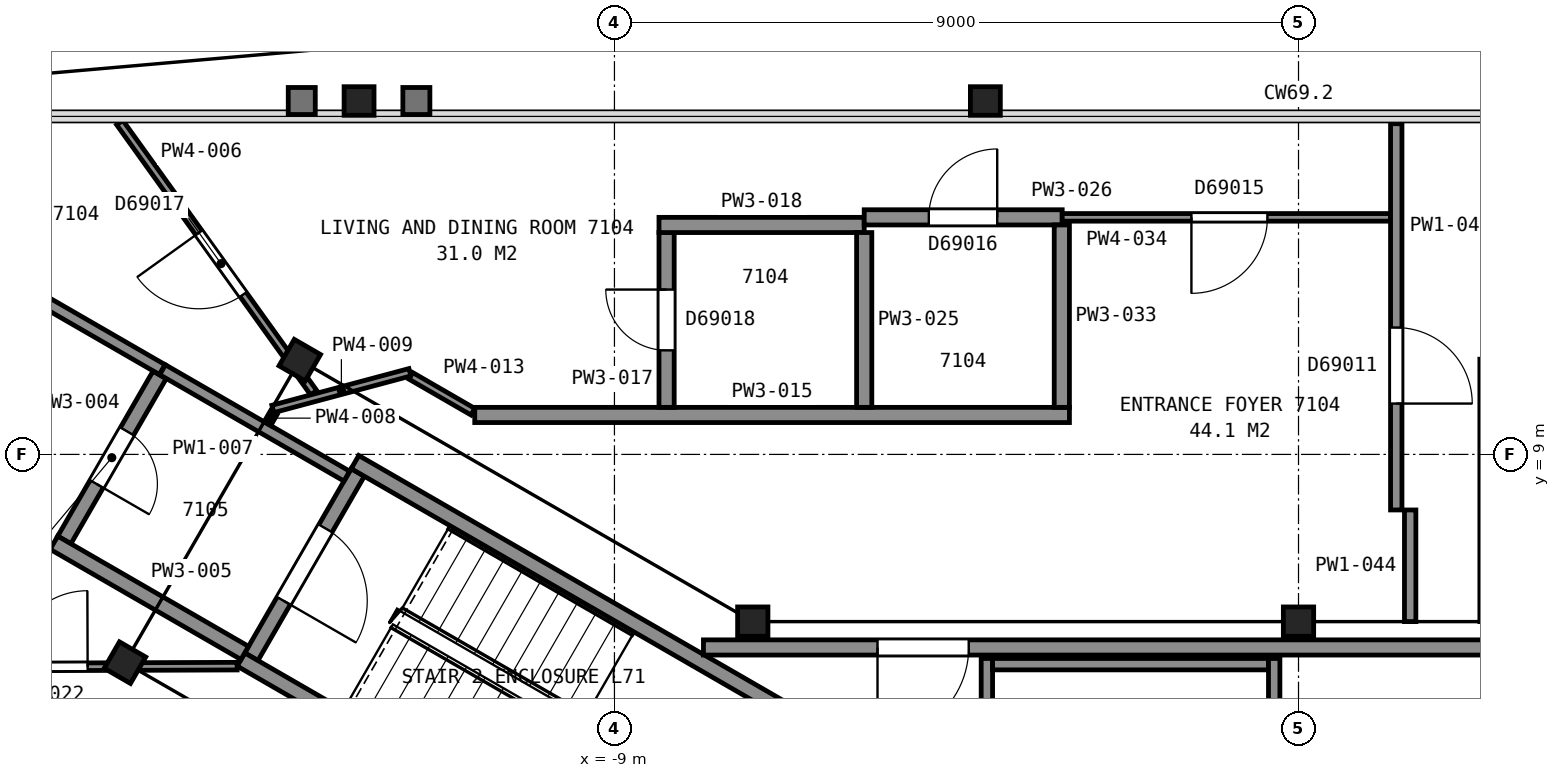
"""IFC4 building model, lengths in metres.
Left out: names, types, materials, properties, quantities, classifications, styles, units other than length and angle.
Written with IfcOpenShell. Run it as: python <this file> out.ifc"""

import sys

from ifc_helpers import new_model, si_unit, direction, frame, frame_2d, origin, origin_2d, place, context, subcontext, project, spatial, rectangle, i_section, extrude, element, fill, save


model = new_model("IFC4")
c1 = context("Model", 3, precision=1e-05, world=origin(), true_north=direction((0.0, 1.0)))
c2 = subcontext(c1, "Body", "Model", "MODEL_VIEW")
j1 = project(units=[si_unit("LENGTHUNIT", "METRE"), si_unit("PLANEANGLEUNIT", "RADIAN")], contexts=[c1])
p1 = place(None, origin())
s1 = spatial("IfcSite", under=j1, at=p1, CompositionType="ELEMENT")
p2 = place(p1, origin())
s2 = spatial("IfcBuilding", under=s1, at=p2, CompositionType="ELEMENT")
p3 = place(p2, frame((0.0, 0.0, 282.5)))
s3 = spatial("IfcBuildingStorey", under=s2, at=p3, CompositionType="ELEMENT", Elevation=282.5)
for number, where, z_axis, x_axis in (
    (1, (-4.12, 13.65, 0.0), (0.0, 0.0, 1.0), (1.0, 0.0, 0.0)),
    (2, (-12.36, 13.65, 0.0), (0.0, 0.0, 1.0), (1.0, 0.0, 0.0)),
):
    element("IfcColumn", number, at=place(p3, frame(where, z_axis=z_axis, x_axis=x_axis)), inside=s3, PredefinedType="COLUMN", context=c2, shape_type="SweptSolid", body=[
        extrude(i_section(OverallWidth=0.394, OverallDepth=0.376, WebThickness=0.017, FlangeThickness=0.028, FilletRadius=0.015, at=origin_2d()), origin(), (0.0, 0.0, 1.0), 3.7),
    ])
for number, where, z_axis, x_axis in (
    (3, (0.0, 6.8, 0.0), (0.0, 0.0, 1.0), (1.0, 0.0, 0.0)),
    (4, (-7.18, 6.8, 0.0), (0.0, 0.0, 1.0), (1.0, 0.0, 0.0)),
):
    element("IfcColumn", number, at=place(p3, frame(where, z_axis=z_axis, x_axis=x_axis)), inside=s3, PredefinedType="COLUMN", context=c2, shape_type="SweptSolid", body=[
        extrude(i_section(OverallWidth=0.399, OverallDepth=0.386, WebThickness=0.021, FlangeThickness=0.033, FilletRadius=0.015, at=origin_2d()), origin(), (0.0, 0.0, 1.0), 3.7),
    ])
for number, where, z_axis, x_axis in (
    (5, (-13.14, 10.24, 0.0), (0.0, 0.0, 1.0), (0.5, 0.866, 0.0)),
    (6, (-15.44, 6.26, 0.0), (0.0, 0.0, 1.0), (0.5, 0.866, 0.0)),
):
    element("IfcColumn", number, at=place(p3, frame(where, z_axis=z_axis, x_axis=x_axis)), inside=s3, PredefinedType="COLUMN", context=c2, shape_type="SweptSolid", body=[
        extrude(i_section(OverallWidth=0.401, OverallDepth=0.399, WebThickness=0.025, FlangeThickness=0.04, FilletRadius=0.015, at=origin_2d()), origin(), (0.0, 0.0, 1.0), 3.7),
    ])
p4 = place(p3, frame((-12.377, 8.762, 0.0), z_axis=(0.0, 0.0, 1.0), x_axis=(-0.500049511043, -0.865996816683, 0.0)))
e7 = element("IfcWall", 7, at=p4, inside=s3, PredefinedType="PARTITIONING", context=c2, shape_type="SweptSolid", body=[
    extrude(rectangle(XDim=2.8, YDim=0.2, at=frame_2d((1.4, 0.0))), origin(), (0.0, 0.0, 1.0), 3.45),
])
p5 = place(p4, frame((0.85, 0.0, 0.0)))
e8 = element("IfcOpeningElement", 8, at=p5, cuts=e7, PredefinedType="OPENING", context=c2, shape_type="SweptSolid", body=[
    extrude(rectangle(XDim=1.1, YDim=2.1, at=frame_2d((0.55, 1.05))), frame((0.0, 0.11, 0.0), z_axis=(0.0, -1.0, 0.0), x_axis=(1.0, 0.0, 0.0)), (0.0, 0.0, 1.0), 0.22),
])
for number, where, z_axis, x_axis in (
    (9, (-7.678, 2.701, 0.0), (0.0, 0.0, 1.0), (-0.866, 0.5, 0.0)),
    (10, (-6.178, 5.299, 0.0), (0.0, 0.0, 1.0), (-0.866, 0.5, 0.0)),
):
    element("IfcWall", number, at=place(p3, frame(where, z_axis=z_axis, x_axis=x_axis)), inside=s3, PredefinedType="PARTITIONING", context=c2, shape_type="SweptSolid", body=[
        extrude(rectangle(XDim=7.2, YDim=0.2, at=frame_2d((3.6, 0.0))), origin(), (0.0, 0.0, 1.0), 3.45),
    ])
p6 = place(p3, frame((7.829, 6.46, 0.0), z_axis=(0.0, 0.0, 1.0), x_axis=(-1.0, 0.0, 0.0)))
e11 = element("IfcWall", 11, at=p6, inside=s3, PredefinedType="PARTITIONING", context=c2, shape_type="SweptSolid", body=[
    extrude(rectangle(XDim=15.658, YDim=0.2, at=frame_2d((7.829, 0.0))), origin(), (0.0, 0.0, 1.0), 3.45),
])
p7 = place(p6, frame((12.168, 0.0, 0.0)))
e12 = element("IfcOpeningElement", 12, at=p7, cuts=e11, PredefinedType="OPENING", context=c2, shape_type="SweptSolid", body=[
    extrude(rectangle(XDim=1.2, YDim=2.1, at=frame_2d((0.6, 1.05))), frame((0.0, 0.11, 0.0), z_axis=(0.0, -1.0, 0.0), x_axis=(1.0, 0.0, 0.0)), (0.0, 0.0, 1.0), 0.22),
])
p8 = place(p3, frame((-4.1, 2.085, 0.0), z_axis=(0.0, 0.0, 1.0), x_axis=(0.0, 1.0, 0.0)))
e13 = element("IfcWall", 13, at=p8, inside=s3, PredefinedType="PARTITIONING", context=c2, shape_type="SweptSolid", body=[
    extrude(rectangle(XDim=4.23, YDim=0.15, at=frame_2d((2.115, 0.0))), origin(), (0.0, 0.0, 1.0), 3.45),
])
p9 = place(p8, frame((1.625, 0.0, 0.0)))
e14 = element("IfcOpeningElement", 14, at=p9, cuts=e13, PredefinedType="OPENING", context=c2, shape_type="SweptSolid", body=[
    extrude(rectangle(XDim=1.0, YDim=2.1, at=frame_2d((0.5, 1.05))), frame((0.0, 0.085, 0.0), z_axis=(0.0, -1.0, 0.0), x_axis=(1.0, 0.0, 0.0)), (0.0, 0.0, 1.0), 0.17),
])
p10 = place(p3, frame((-4.025, 6.24, 0.0), z_axis=(0.0, 0.0, 1.0), x_axis=(1.0, 0.0, 0.0)))
e15 = element("IfcWall", 15, at=p10, inside=s3, PredefinedType="PARTITIONING", context=c2, shape_type="SweptSolid", body=[
    extrude(rectangle(XDim=3.63, YDim=0.15, at=frame_2d((1.815, 0.0))), origin(), (0.0, 0.0, 1.0), 3.45),
])
p11 = place(p3, frame((-0.32, 2.252, 0.0), z_axis=(0.0, 0.0, 1.0), x_axis=(0.0, 1.0, 0.0)))
e16 = element("IfcWall", 16, at=p11, inside=s3, PredefinedType="PARTITIONING", context=c2, shape_type="SweptSolid", body=[
    extrude(rectangle(XDim=4.063, YDim=0.15, at=frame_2d((2.031, 0.0))), origin(), (0.0, 0.0, 1.0), 3.45),
])
p12 = place(p3, frame((-20.506, 13.324, 0.0), z_axis=(0.0, 0.0, 1.0), x_axis=(0.866004971522, -0.500035388047, 0.0)))
e17 = element("IfcWall", 17, at=p12, inside=s3, PredefinedType="PARTITIONING", context=c2, shape_type="SweptSolid", body=[
    extrude(rectangle(XDim=6.416, YDim=0.15, at=frame_2d((3.208, 0.0))), origin(), (0.0, 0.0, 1.0), 2.723),
])
p13 = place(p3, frame((-19.005, 6.196, 0.0), z_axis=(0.0, 0.0, 1.0), x_axis=(0.999993403855, 0.003632113191, 0.0)))
e18 = element("IfcWall", 18, at=p13, inside=s3, PredefinedType="PARTITIONING", context=c2, shape_type="SweptSolid", body=[
    extrude(rectangle(XDim=5.041, YDim=0.1, at=frame_2d((2.521, 0.0))), origin(), (0.0, 0.0, 1.0), 2.723),
])
p14 = place(p13, frame((2.074, 0.0, 0.0)))
e19 = element("IfcOpeningElement", 19, at=p14, cuts=e18, PredefinedType="OPENING", context=c2, shape_type="SweptSolid", body=[
    extrude(rectangle(XDim=1.0, YDim=2.1, at=frame_2d((0.5, 1.05))), frame((0.0, 0.06, 0.0), z_axis=(0.0, -1.0, 0.0), x_axis=(1.0, 0.0, 0.0)), (0.0, 0.0, 1.0), 0.12),
])
p15 = place(p3, frame((-14.985, 10.045, 0.0), z_axis=(0.0, 0.0, 1.0), x_axis=(-0.499995137693, -0.86602821102, 0.0)))
e20 = element("IfcWall", 20, at=p15, inside=s3, PredefinedType="PARTITIONING", context=c2, shape_type="SweptSolid", body=[
    extrude(rectangle(XDim=2.506, YDim=0.2, at=frame_2d((1.253, 0.0))), origin(), (0.0, 0.0, 1.0), 2.723),
])
p16 = place(p15, frame((0.856, 0.0, 0.0)))
e21 = element("IfcOpeningElement", 21, at=p16, cuts=e20, PredefinedType="OPENING", context=c2, shape_type="SweptSolid", body=[
    extrude(rectangle(XDim=0.8, YDim=2.1, at=frame_2d((0.4, 1.05))), frame((0.0, 0.11, 0.0), z_axis=(0.0, -1.0, 0.0), x_axis=(1.0, 0.0, 0.0)), (0.0, 0.0, 1.0), 0.22),
])
p17 = place(p3, frame((-16.375, 7.838, 0.0), z_axis=(0.0, 0.0, 1.0), x_axis=(0.865912083802, -0.500196224622, 0.0)))
e22 = element("IfcWall", 22, at=p17, inside=s3, PredefinedType="PARTITIONING", context=c2, shape_type="SweptSolid", body=[
    extrude(rectangle(XDim=2.899, YDim=0.2, at=frame_2d((1.45, 0.0))), origin(), (0.0, 0.0, 1.0), 2.723),
])
p18 = place(p3, frame((-12.957, 9.812, 0.0), z_axis=(0.0, 0.0, 1.0), x_axis=(-0.58313691272, 0.812373892381, 0.0)))
e23 = element("IfcWall", 23, at=p18, inside=s3, PredefinedType="PARTITIONING", context=c2, shape_type="SweptSolid", body=[
    extrude(rectangle(XDim=4.375, YDim=0.1, at=frame_2d((2.188, 0.0))), origin(), (0.0, 0.0, 1.0), 2.723),
])
p19 = place(p18, frame((1.59, 0.0, 0.0)))
e24 = element("IfcOpeningElement", 24, at=p19, cuts=e23, PredefinedType="OPENING", context=c2, shape_type="SweptSolid", body=[
    extrude(rectangle(XDim=1.0, YDim=2.1, at=frame_2d((0.5, 1.05))), frame((0.0, 0.06, 0.0), z_axis=(0.0, -1.0, 0.0), x_axis=(1.0, 0.0, 0.0)), (0.0, 0.0, 1.0), 0.12),
])
p20 = place(p3, frame((-14.945, 10.114, 0.0), z_axis=(0.0, 0.0, 1.0), x_axis=(0.865969158485, -0.500097407065, 0.0)))
e25 = element("IfcWall", 25, at=p20, inside=s3, PredefinedType="PARTITIONING", context=c2, shape_type="SweptSolid", body=[
    extrude(rectangle(XDim=2.799, YDim=0.15, at=frame_2d((1.4, 0.0))), origin(), (0.0, 0.0, 1.0), 2.723),
])
p21 = place(p3, frame((-13.565, 9.404, 0.0), z_axis=(0.0, 0.0, 1.0), x_axis=(0.500181256421, 0.865920730047, 0.0)))
e26 = element("IfcWall", 26, at=p21, inside=s3, PredefinedType="PARTITIONING", context=c2, shape_type="SweptSolid", body=[
    extrude(rectangle(XDim=0.169, YDim=0.1, at=frame_2d((0.084, 0.0))), origin(), (0.0, 0.0, 1.0), 2.723),
])
p22 = place(p3, frame((-13.494, 9.598, 0.0), z_axis=(0.0, 0.0, 1.0), x_axis=(0.96601104623, 0.258500790254, 0.0)))
e27 = element("IfcWall", 27, at=p22, inside=s3, PredefinedType="PARTITIONING", context=c2, shape_type="SweptSolid", body=[
    extrude(rectangle(XDim=1.867, YDim=0.1, at=frame_2d((0.934, 0.0))), origin(), (0.0, 0.0, 1.0), 2.723),
])
p23 = place(p3, frame((-11.678, 10.033, 0.0), z_axis=(0.0, 0.0, 1.0), x_axis=(0.866116627388, -0.499841962787, 0.0)))
e28 = element("IfcWall", 28, at=p23, inside=s3, PredefinedType="PARTITIONING", context=c2, shape_type="SweptSolid", body=[
    extrude(rectangle(XDim=0.943, YDim=0.1, at=frame_2d((0.472, 0.0))), origin(), (0.0, 0.0, 1.0), 2.723),
])
p24 = place(p3, frame((-10.838, 9.519, 0.0), z_axis=(0.0, 0.0, 1.0), x_axis=(1.0, 0.0, 0.0)))
e29 = element("IfcWall", 29, at=p24, inside=s3, PredefinedType="PARTITIONING", context=c2, shape_type="SweptSolid", body=[
    extrude(rectangle(XDim=7.824, YDim=0.2, at=frame_2d((3.912, 0.0))), origin(), (0.0, 0.0, 1.0), 2.723),
])
p25 = place(p3, frame((-8.314, 11.919, 0.0), z_axis=(0.0, 0.0, 1.0), x_axis=(0.0, -1.0, 0.0)))
e30 = element("IfcWall", 30, at=p25, inside=s3, PredefinedType="PARTITIONING", context=c2, shape_type="SweptSolid", body=[
    extrude(rectangle(XDim=2.3, YDim=0.2, at=frame_2d((1.15, 0.0))), origin(), (0.0, 0.0, 1.0), 2.723),
])
p26 = place(p25, frame((0.75, 0.0, 0.0)))
e31 = element("IfcOpeningElement", 31, at=p26, cuts=e30, PredefinedType="OPENING", context=c2, shape_type="SweptSolid", body=[
    extrude(rectangle(XDim=0.8, YDim=2.1, at=frame_2d((0.4, 1.05))), frame((0.0, 0.11, 0.0), z_axis=(0.0, -1.0, 0.0), x_axis=(1.0, 0.0, 0.0)), (0.0, 0.0, 1.0), 0.22),
])
p27 = place(p3, frame((-8.414, 12.019, 0.0), z_axis=(0.0, 0.0, 1.0), x_axis=(1.0, 0.0, 0.0)))
e32 = element("IfcWall", 32, at=p27, inside=s3, PredefinedType="PARTITIONING", context=c2, shape_type="SweptSolid", body=[
    extrude(rectangle(XDim=2.7, YDim=0.2, at=frame_2d((1.35, 0.0))), origin(), (0.0, 0.0, 1.0), 2.723),
])
p28 = place(p3, frame((-5.714, 9.619, 0.0), z_axis=(0.0, 0.0, 1.0), x_axis=(0.0, 1.0, 0.0)))
e33 = element("IfcWall", 33, at=p28, inside=s3, PredefinedType="PARTITIONING", context=c2, shape_type="SweptSolid", body=[
    extrude(rectangle(XDim=2.3, YDim=0.2, at=frame_2d((1.15, 0.0))), origin(), (0.0, 0.0, 1.0), 2.723),
])
p29 = place(p3, frame((-3.109, 12.119, 0.0), z_axis=(0.0, 0.0, 1.0), x_axis=(-1.0, 0.0, 0.0)))
e34 = element("IfcWall", 34, at=p29, inside=s3, PredefinedType="PARTITIONING", context=c2, shape_type="SweptSolid", body=[
    extrude(rectangle(XDim=2.605, YDim=0.2, at=frame_2d((1.303, 0.0))), origin(), (0.0, 0.0, 1.0), 2.723),
])
p30 = place(p29, frame((0.855, 0.0, 0.0)))
e35 = element("IfcOpeningElement", 35, at=p30, cuts=e34, PredefinedType="OPENING", context=c2, shape_type="SweptSolid", body=[
    extrude(rectangle(XDim=0.9, YDim=2.1, at=frame_2d((0.45, 1.05))), frame((0.0, 0.11, 0.0), z_axis=(0.0, -1.0, 0.0), x_axis=(1.0, 0.0, 0.0)), (0.0, 0.0, 1.0), 0.22),
])
p31 = place(p3, frame((-3.114, 9.619, 0.0), z_axis=(0.0, 0.0, 1.0), x_axis=(0.0, 1.0, 0.0)))
e36 = element("IfcWall", 36, at=p31, inside=s3, PredefinedType="PARTITIONING", context=c2, shape_type="SweptSolid", body=[
    extrude(rectangle(XDim=2.4, YDim=0.2, at=frame_2d((1.2, 0.0))), origin(), (0.0, 0.0, 1.0), 2.723),
])
p32 = place(p3, frame((-3.109, 12.119, 0.0), z_axis=(0.0, 0.0, 1.0), x_axis=(1.0, 0.0, 0.0)))
e37 = element("IfcWall", 37, at=p32, inside=s3, PredefinedType="PARTITIONING", context=c2, shape_type="SweptSolid", body=[
    extrude(rectangle(XDim=4.32, YDim=0.1, at=frame_2d((2.16, 0.0))), origin(), (0.0, 0.0, 1.0), 2.723),
])
p33 = place(p32, frame((1.7, 0.0, 0.0)))
e38 = element("IfcOpeningElement", 38, at=p33, cuts=e37, PredefinedType="OPENING", context=c2, shape_type="SweptSolid", body=[
    extrude(rectangle(XDim=1.0, YDim=2.1, at=frame_2d((0.5, 1.05))), frame((0.0, 0.06, 0.0), z_axis=(0.0, -1.0, 0.0), x_axis=(1.0, 0.0, 0.0)), (0.0, 0.0, 1.0), 0.12),
])
p34 = place(p3, frame((1.286, 13.351, 0.0), z_axis=(0.0, 0.0, 1.0), x_axis=(0.0, -1.0, 0.0)))
e39 = element("IfcWall", 39, at=p34, inside=s3, PredefinedType="PARTITIONING", context=c2, shape_type="SweptSolid", body=[
    extrude(rectangle(XDim=5.082, YDim=0.15, at=frame_2d((2.541, 0.0))), origin(), (0.0, 0.0, 1.0), 2.723),
])
p35 = place(p34, frame((2.682, 0.0, 0.0)))
e40 = element("IfcOpeningElement", 40, at=p35, cuts=e39, PredefinedType="OPENING", context=c2, shape_type="SweptSolid", body=[
    extrude(rectangle(XDim=1.0, YDim=2.1, at=frame_2d((0.5, 1.05))), frame((0.0, 0.085, 0.0), z_axis=(0.0, -1.0, 0.0), x_axis=(1.0, 0.0, 0.0)), (0.0, 0.0, 1.0), 0.17),
])
p36 = place(p3, frame((1.469, 6.8, 0.0), z_axis=(0.0, 0.0, 1.0), x_axis=(0.0, 1.0, 0.0)))
e41 = element("IfcWall", 41, at=p36, inside=s3, PredefinedType="PARTITIONING", context=c2, shape_type="SweptSolid", body=[
    extrude(rectangle(XDim=1.469, YDim=0.15, at=frame_2d((0.734, 0.0))), origin(), (0.0, 0.0, 1.0), 2.723),
])
p37 = place(p3, frame((2.486, 6.8, 0.0), z_axis=(0.0, 0.0, 1.0), x_axis=(0.0, 1.0, 0.0)))
e42 = element("IfcWall", 42, at=p37, inside=s3, PredefinedType="PARTITIONING", context=c2, shape_type="SweptSolid", body=[
    extrude(rectangle(XDim=3.453, YDim=0.2, at=frame_2d((1.727, 0.0))), origin(), (0.0, 0.0, 1.0), 2.723),
])
p38 = place(p5, origin())
e43 = element("IfcDoor", 43, at=p38, inside=s3, OperationType="SINGLE_SWING_RIGHT", PredefinedType="DOOR", context=c2, shape_type="SweptSolid", body=[
    extrude(rectangle(XDim=1.1, YDim=2.1, at=frame_2d((0.55, 1.05))), frame((0.0, 0.025, 0.0), z_axis=(0.0, -1.0, 0.0), x_axis=(1.0, 0.0, 0.0)), (0.0, 0.0, 1.0), 0.05),
])
fill(e8, e43)
p39 = place(p7, origin())
e44 = element("IfcDoor", 44, at=p39, inside=s3, OperationType="SINGLE_SWING_RIGHT", PredefinedType="DOOR", context=c2, shape_type="SweptSolid", body=[
    extrude(rectangle(XDim=1.2, YDim=2.1, at=frame_2d((0.6, 1.05))), frame((0.0, 0.025, 0.0), z_axis=(0.0, -1.0, 0.0), x_axis=(1.0, 0.0, 0.0)), (0.0, 0.0, 1.0), 0.05),
])
fill(e12, e44)
p40 = place(p14, origin())
e45 = element("IfcDoor", 45, at=p40, inside=s3, OperationType="SINGLE_SWING_RIGHT", PredefinedType="DOOR", context=c2, shape_type="SweptSolid", body=[
    extrude(rectangle(XDim=1.0, YDim=2.1, at=frame_2d((0.5, 1.05))), frame((0.0, 0.025, 0.0), z_axis=(0.0, -1.0, 0.0), x_axis=(1.0, 0.0, 0.0)), (0.0, 0.0, 1.0), 0.05),
])
fill(e19, e45)
p41 = place(p16, origin())
e46 = element("IfcDoor", 46, at=p41, inside=s3, OperationType="SINGLE_SWING_RIGHT", PredefinedType="DOOR", context=c2, shape_type="SweptSolid", body=[
    extrude(rectangle(XDim=0.8, YDim=2.1, at=frame_2d((0.4, 1.05))), frame((0.0, 0.025, 0.0), z_axis=(0.0, -1.0, 0.0), x_axis=(1.0, 0.0, 0.0)), (0.0, 0.0, 1.0), 0.05),
])
fill(e21, e46)
p42 = place(p19, origin())
e47 = element("IfcDoor", 47, at=p42, inside=s3, OperationType="SINGLE_SWING_RIGHT", PredefinedType="DOOR", context=c2, shape_type="SweptSolid", body=[
    extrude(rectangle(XDim=1.0, YDim=2.1, at=frame_2d((0.5, 1.05))), frame((0.0, 0.025, 0.0), z_axis=(0.0, -1.0, 0.0), x_axis=(1.0, 0.0, 0.0)), (0.0, 0.0, 1.0), 0.05),
])
fill(e24, e47)
p43 = place(p26, origin())
e48 = element("IfcDoor", 48, at=p43, inside=s3, OperationType="SINGLE_SWING_LEFT", PredefinedType="DOOR", context=c2, shape_type="SweptSolid", body=[
    extrude(rectangle(XDim=0.8, YDim=2.1, at=frame_2d((0.4, 1.05))), frame((0.0, 0.025, 0.0), z_axis=(0.0, -1.0, 0.0), x_axis=(1.0, 0.0, 0.0)), (0.0, 0.0, 1.0), 0.05),
])
fill(e31, e48)
p44 = place(p30, origin())
e49 = element("IfcDoor", 49, at=p44, inside=s3, OperationType="SINGLE_SWING_LEFT", PredefinedType="DOOR", context=c2, shape_type="SweptSolid", body=[
    extrude(rectangle(XDim=0.9, YDim=2.1, at=frame_2d((0.45, 1.05))), frame((0.0, 0.025, 0.0), z_axis=(0.0, -1.0, 0.0), x_axis=(1.0, 0.0, 0.0)), (0.0, 0.0, 1.0), 0.05),
])
fill(e35, e49)
p45 = place(p33, origin())
e50 = element("IfcDoor", 50, at=p45, inside=s3, OperationType="SINGLE_SWING_LEFT", PredefinedType="DOOR", context=c2, shape_type="SweptSolid", body=[
    extrude(rectangle(XDim=1.0, YDim=2.1, at=frame_2d((0.5, 1.05))), frame((0.0, 0.025, 0.0), z_axis=(0.0, -1.0, 0.0), x_axis=(1.0, 0.0, 0.0)), (0.0, 0.0, 1.0), 0.05),
])
fill(e38, e50)
p46 = place(p35, origin())
e51 = element("IfcDoor", 51, at=p46, inside=s3, OperationType="SINGLE_SWING_RIGHT", PredefinedType="DOOR", context=c2, shape_type="SweptSolid", body=[
    extrude(rectangle(XDim=1.0, YDim=2.1, at=frame_2d((0.5, 1.05))), frame((0.0, 0.025, 0.0), z_axis=(0.0, -1.0, 0.0), x_axis=(1.0, 0.0, 0.0)), (0.0, 0.0, 1.0), 0.05),
])
fill(e40, e51)
save(model, sys.argv[1])
